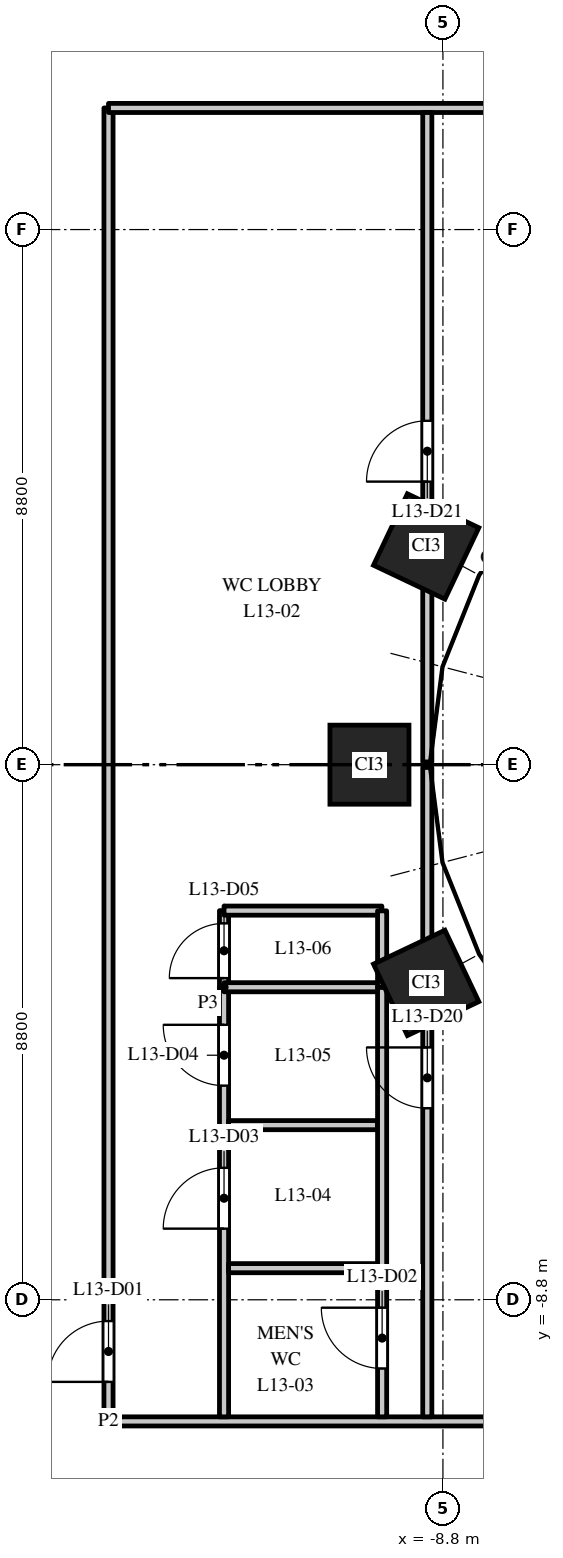
"""IFC4 building model, lengths in metres.
Left out: names, types, materials, properties, quantities, classifications, styles, units other than length and angle.
Written with IfcOpenShell. Run it as: python <this file> out.ifc"""

import sys

from ifc_helpers import new_model, si_unit, direction, frame, frame_2d, origin, origin_2d, place, context, subcontext, project, spatial, rectangle, extrude, element, fill, save


model = new_model("IFC4")
c1 = context("Model", 3, precision=1e-05, world=origin(), true_north=direction((0.0, 1.0)))
c2 = subcontext(c1, "Body", "Model", "MODEL_VIEW")
j1 = project(units=[si_unit("LENGTHUNIT", "METRE"), si_unit("PLANEANGLEUNIT", "RADIAN")], contexts=[c1])
p1 = place(None, origin())
s1 = spatial("IfcSite", under=j1, at=p1, CompositionType="ELEMENT")
p2 = place(p1, origin())
s2 = spatial("IfcBuilding", under=s1, at=p2, CompositionType="ELEMENT")
p3 = place(p2, frame((0.0, 0.0, 62.5)))
s3 = spatial("IfcBuildingStorey", under=s2, at=p3, CompositionType="ELEMENT", Elevation=62.5)
for number, where, z_axis, x_axis in (
    (1, (-9.076, 3.588, 0.0), (0.0, 0.0, 1.0), (-0.429, -0.903, 0.0)),
    (2, (-10.008, 0.0, 0.0), (0.0, 0.0, 1.0), (0.0, -1.0, 0.0)),
    (3, (-9.076, -3.588, 0.0), (0.0, 0.0, 1.0), (0.429, -0.903, 0.0)),
):
    element("IfcColumn", number, at=place(p3, frame(where, z_axis=z_axis, x_axis=x_axis)), inside=s3, PredefinedType="COLUMN", context=c2, shape_type="SweptSolid", body=[
        extrude(rectangle(XDim=1.3, YDim=1.3, at=origin_2d()), origin(), (0.0, 0.0, 1.0), 4.0),
    ])
p4 = place(p3, frame((-14.3, -10.8, 0.0), z_axis=(0.0, 0.0, 1.0), x_axis=(0.0, 1.0, 0.0)))
e4 = element("IfcWall", 4, at=p4, inside=s3, PredefinedType="PARTITIONING", context=c2, shape_type="SweptSolid", body=[
    extrude(rectangle(XDim=21.6, YDim=0.15, at=frame_2d((10.8, 0.0))), origin(), (0.0, 0.0, 1.0), 2.75),
])
p5 = place(p4, frame((0.65, 0.0, 0.0)))
e5 = element("IfcOpeningElement", 5, at=p5, cuts=e4, PredefinedType="OPENING", context=c2, shape_type="SweptSolid", body=[
    extrude(rectangle(XDim=1.0, YDim=2.1, at=frame_2d((0.5, 1.05))), frame((0.0, 0.085, 0.0), z_axis=(0.0, -1.0, 0.0), x_axis=(1.0, 0.0, 0.0)), (0.0, 0.0, 1.0), 0.17),
])
p6 = place(p3, frame((-14.3, -10.8, 0.0), z_axis=(0.0, 0.0, 1.0), x_axis=(1.0, 0.0, 0.0)))
e6 = element("IfcWall", 6, at=p6, inside=s3, PredefinedType="PARTITIONING", context=c2, shape_type="SweptSolid", body=[
    extrude(rectangle(XDim=28.6, YDim=0.15, at=frame_2d((14.3, 0.0))), origin(), (0.0, 0.0, 1.0), 2.85),
])
p7 = place(p6, frame((10.627, 0.0, 0.0)))
e7 = element("IfcOpeningElement", 7, at=p7, cuts=e6, PredefinedType="OPENING", context=c2, shape_type="SweptSolid", body=[
    extrude(rectangle(XDim=1.0, YDim=2.1, at=frame_2d((0.5, 1.05))), frame((0.0, 0.085, 0.0), z_axis=(0.0, -1.0, 0.0), x_axis=(1.0, 0.0, 0.0)), (0.0, 0.0, 1.0), 0.17),
])
p8 = place(p6, frame((15.393, 0.0, 0.0)))
e8 = element("IfcOpeningElement", 8, at=p8, cuts=e6, PredefinedType="OPENING", context=c2, shape_type="SweptSolid", body=[
    extrude(rectangle(XDim=1.0, YDim=2.1, at=frame_2d((0.5, 1.05))), frame((0.0, 0.085, 0.0), z_axis=(0.0, -1.0, 0.0), x_axis=(1.0, 0.0, 0.0)), (0.0, 0.0, 1.0), 0.17),
])
p9 = place(p3, frame((-14.3, 10.8, 0.0), z_axis=(0.0, 0.0, 1.0), x_axis=(1.0, 0.0, 0.0)))
e9 = element("IfcWall", 9, at=p9, inside=s3, PredefinedType="PARTITIONING", context=c2, shape_type="SweptSolid", body=[
    extrude(rectangle(XDim=28.6, YDim=0.15, at=frame_2d((14.3, 0.0))), origin(), (0.0, 0.0, 1.0), 2.85),
])
p10 = place(p9, frame((10.66, 0.0, 0.0)))
e10 = element("IfcOpeningElement", 10, at=p10, cuts=e9, PredefinedType="OPENING", context=c2, shape_type="SweptSolid", body=[
    extrude(rectangle(XDim=1.0, YDim=2.1, at=frame_2d((0.5, 1.05))), frame((0.0, 0.085, 0.0), z_axis=(0.0, -1.0, 0.0), x_axis=(1.0, 0.0, 0.0)), (0.0, 0.0, 1.0), 0.17),
])
p11 = place(p9, frame((15.427, 0.0, 0.0)))
e11 = element("IfcOpeningElement", 11, at=p11, cuts=e9, PredefinedType="OPENING", context=c2, shape_type="SweptSolid", body=[
    extrude(rectangle(XDim=1.0, YDim=2.1, at=frame_2d((0.5, 1.05))), frame((0.0, 0.085, 0.0), z_axis=(0.0, -1.0, 0.0), x_axis=(1.0, 0.0, 0.0)), (0.0, 0.0, 1.0), 0.17),
])
p12 = place(p9, frame((22.693, 0.0, 0.0)))
e12 = element("IfcOpeningElement", 12, at=p12, cuts=e9, PredefinedType="OPENING", context=c2, shape_type="SweptSolid", body=[
    extrude(rectangle(XDim=1.0, YDim=2.1, at=frame_2d((0.5, 1.05))), frame((0.0, 0.085, 0.0), z_axis=(0.0, -1.0, 0.0), x_axis=(1.0, 0.0, 0.0)), (0.0, 0.0, 1.0), 0.17),
])
p13 = place(p3, frame((-12.4, -10.725, 0.0), z_axis=(0.0, 0.0, 1.0), x_axis=(0.0, 1.0, 0.0)))
e13 = element("IfcWall", 13, at=p13, inside=s3, PredefinedType="PARTITIONING", context=c2, shape_type="SweptSolid", body=[
    extrude(rectangle(XDim=7.065, YDim=0.15, at=frame_2d((3.533, 0.0))), origin(), (0.0, 0.0, 1.0), 2.75),
])
p14 = place(p13, frame((3.095, 0.0, 0.0)))
e14 = element("IfcOpeningElement", 14, at=p14, cuts=e13, PredefinedType="OPENING", context=c2, shape_type="SweptSolid", body=[
    extrude(rectangle(XDim=1.0, YDim=2.1, at=frame_2d((0.5, 1.05))), frame((0.0, 0.085, 0.0), z_axis=(0.0, -1.0, 0.0), x_axis=(1.0, 0.0, 0.0)), (0.0, 0.0, 1.0), 0.17),
])
p15 = place(p13, frame((5.447, 0.0, 0.0)))
e15 = element("IfcOpeningElement", 15, at=p15, cuts=e13, PredefinedType="OPENING", context=c2, shape_type="SweptSolid", body=[
    extrude(rectangle(XDim=1.0, YDim=2.1, at=frame_2d((0.5, 1.05))), frame((0.0, 0.085, 0.0), z_axis=(0.0, -1.0, 0.0), x_axis=(1.0, 0.0, 0.0)), (0.0, 0.0, 1.0), 0.17),
])
p16 = place(p3, frame((-12.325, -8.28, 0.0), z_axis=(0.0, 0.0, 1.0), x_axis=(1.0, 0.0, 0.0)))
e16 = element("IfcWall", 16, at=p16, inside=s3, PredefinedType="PARTITIONING", context=c2, shape_type="SweptSolid", body=[
    extrude(rectangle(XDim=2.45, YDim=0.15, at=frame_2d((1.225, 0.0))), origin(), (0.0, 0.0, 1.0), 2.75),
])
p17 = place(p3, frame((-12.325, -5.928, 0.0), z_axis=(0.0, 0.0, 1.0), x_axis=(1.0, 0.0, 0.0)))
e17 = element("IfcWall", 17, at=p17, inside=s3, PredefinedType="PARTITIONING", context=c2, shape_type="SweptSolid", body=[
    extrude(rectangle(XDim=2.45, YDim=0.15, at=frame_2d((1.225, 0.0))), origin(), (0.0, 0.0, 1.0), 3.7),
])
p18 = place(p3, frame((-12.4, -3.66, 0.0), z_axis=(0.0, 0.0, 1.0), x_axis=(0.0, 1.0, 0.0)))
e18 = element("IfcWall", 18, at=p18, inside=s3, PredefinedType="PARTITIONING", context=c2, shape_type="SweptSolid", body=[
    extrude(rectangle(XDim=1.26, YDim=0.15, at=frame_2d((0.63, 0.0))), origin(), (0.0, 0.0, 1.0), 3.7),
])
p19 = place(p18, frame((0.15, 0.0, 0.0)))
e19 = element("IfcOpeningElement", 19, at=p19, cuts=e18, PredefinedType="OPENING", context=c2, shape_type="SweptSolid", body=[
    extrude(rectangle(XDim=0.9, YDim=2.1, at=frame_2d((0.45, 1.05))), frame((0.0, 0.085, 0.0), z_axis=(0.0, -1.0, 0.0), x_axis=(1.0, 0.0, 0.0)), (0.0, 0.0, 1.0), 0.17),
])
p20 = place(p3, frame((-12.4, -3.66, 0.0), z_axis=(0.0, 0.0, 1.0), x_axis=(1.0, 0.0, 0.0)))
e20 = element("IfcWall", 20, at=p20, inside=s3, PredefinedType="PARTITIONING", context=c2, shape_type="SweptSolid", body=[
    extrude(rectangle(XDim=2.6, YDim=0.15, at=frame_2d((1.3, 0.0))), origin(), (0.0, 0.0, 1.0), 3.7),
])
p21 = place(p3, frame((-12.4, -2.4, 0.0), z_axis=(0.0, 0.0, 1.0), x_axis=(1.0, 0.0, 0.0)))
e21 = element("IfcWall", 21, at=p21, inside=s3, PredefinedType="PARTITIONING", context=c2, shape_type="SweptSolid", body=[
    extrude(rectangle(XDim=2.596, YDim=0.15, at=frame_2d((1.298, 0.0))), origin(), (0.0, 0.0, 1.0), 3.7),
])
p22 = place(p3, frame((-9.8, -10.725, 0.0), z_axis=(0.0, 0.0, 1.0), x_axis=(0.0, 1.0, 0.0)))
e22 = element("IfcWall", 22, at=p22, inside=s3, PredefinedType="PARTITIONING", context=c2, shape_type="SweptSolid", body=[
    extrude(rectangle(XDim=7.065, YDim=0.15, at=frame_2d((3.533, 0.0))), origin(), (0.0, 0.0, 1.0), 2.75),
])
p23 = place(p22, frame((0.795, 0.0, 0.0)))
e23 = element("IfcOpeningElement", 23, at=p23, cuts=e22, PredefinedType="OPENING", context=c2, shape_type="SweptSolid", body=[
    extrude(rectangle(XDim=1.0, YDim=2.1, at=frame_2d((0.5, 1.05))), frame((0.0, 0.085, 0.0), z_axis=(0.0, -1.0, 0.0), x_axis=(1.0, 0.0, 0.0)), (0.0, 0.0, 1.0), 0.17),
])
p24 = place(p3, frame((-9.8, -3.66, 0.0), z_axis=(0.0, 0.0, 1.0), x_axis=(0.0, 1.0, 0.0)))
e24 = element("IfcWall", 24, at=p24, inside=s3, PredefinedType="PARTITIONING", context=c2, shape_type="SweptSolid", body=[
    extrude(rectangle(XDim=1.256, YDim=0.15, at=frame_2d((0.628, 0.0))), origin(), (0.0, 0.0, 1.0), 3.7),
])
p25 = place(p3, frame((-9.057, -10.725, 0.0), z_axis=(0.0, 0.0, 1.0), x_axis=(0.0, 1.0, 0.0)))
e25 = element("IfcWall", 25, at=p25, inside=s3, PredefinedType="PARTITIONING", context=c2, shape_type="SweptSolid", body=[
    extrude(rectangle(XDim=10.68, YDim=0.15, at=frame_2d((5.34, 0.0))), origin(), (0.0, 0.0, 1.0), 2.75),
])
p26 = place(p25, frame((5.075, 0.0, 0.0)))
e26 = element("IfcOpeningElement", 26, at=p26, cuts=e25, PredefinedType="OPENING", context=c2, shape_type="SweptSolid", body=[
    extrude(rectangle(XDim=1.0, YDim=2.1, at=frame_2d((0.5, 1.05))), frame((0.0, 0.085, 0.0), z_axis=(0.0, -1.0, 0.0), x_axis=(1.0, 0.0, 0.0)), (0.0, 0.0, 1.0), 0.17),
])
p27 = place(p3, frame((-9.057, 0.045, 0.0), z_axis=(0.0, 0.0, 1.0), x_axis=(0.0, 1.0, 0.0)))
e27 = element("IfcWall", 27, at=p27, inside=s3, PredefinedType="PARTITIONING", context=c2, shape_type="SweptSolid", body=[
    extrude(rectangle(XDim=10.68, YDim=0.15, at=frame_2d((5.34, 0.0))), origin(), (0.0, 0.0, 1.0), 2.75),
])
p28 = place(p27, frame((4.61, 0.0, 0.0)))
e28 = element("IfcOpeningElement", 28, at=p28, cuts=e27, PredefinedType="OPENING", context=c2, shape_type="SweptSolid", body=[
    extrude(rectangle(XDim=1.0, YDim=2.1, at=frame_2d((0.5, 1.05))), frame((0.0, 0.085, 0.0), z_axis=(0.0, -1.0, 0.0), x_axis=(1.0, 0.0, 0.0)), (0.0, 0.0, 1.0), 0.17),
])
p29 = place(p5, origin())
e29 = element("IfcDoor", 29, at=p29, inside=s3, OperationType="SINGLE_SWING_LEFT", PredefinedType="DOOR", context=c2, shape_type="SweptSolid", body=[
    extrude(rectangle(XDim=1.0, YDim=2.1, at=frame_2d((0.5, 1.05))), frame((0.0, 0.025, 0.0), z_axis=(0.0, -1.0, 0.0), x_axis=(1.0, 0.0, 0.0)), (0.0, 0.0, 1.0), 0.05),
])
fill(e5, e29)
p30 = place(p23, origin())
e30 = element("IfcDoor", 30, at=p30, inside=s3, OperationType="SINGLE_SWING_RIGHT", PredefinedType="DOOR", context=c2, shape_type="SweptSolid", body=[
    extrude(rectangle(XDim=1.0, YDim=2.1, at=frame_2d((0.5, 1.05))), frame((0.0, 0.025, 0.0), z_axis=(0.0, -1.0, 0.0), x_axis=(1.0, 0.0, 0.0)), (0.0, 0.0, 1.0), 0.05),
])
fill(e23, e30)
p31 = place(p14, origin())
e31 = element("IfcDoor", 31, at=p31, inside=s3, OperationType="SINGLE_SWING_LEFT", PredefinedType="DOOR", context=c2, shape_type="SweptSolid", body=[
    extrude(rectangle(XDim=1.0, YDim=2.1, at=frame_2d((0.5, 1.05))), frame((0.0, 0.025, 0.0), z_axis=(0.0, -1.0, 0.0), x_axis=(1.0, 0.0, 0.0)), (0.0, 0.0, 1.0), 0.05),
])
fill(e14, e31)
p32 = place(p15, origin())
e32 = element("IfcDoor", 32, at=p32, inside=s3, OperationType="SINGLE_SWING_RIGHT", PredefinedType="DOOR", context=c2, shape_type="SweptSolid", body=[
    extrude(rectangle(XDim=1.0, YDim=2.1, at=frame_2d((0.5, 1.05))), frame((0.0, 0.025, 0.0), z_axis=(0.0, -1.0, 0.0), x_axis=(1.0, 0.0, 0.0)), (0.0, 0.0, 1.0), 0.05),
])
fill(e15, e32)
p33 = place(p19, origin())
e33 = element("IfcDoor", 33, at=p33, inside=s3, OperationType="SINGLE_SWING_LEFT", PredefinedType="DOOR", context=c2, shape_type="SweptSolid", body=[
    extrude(rectangle(XDim=0.9, YDim=2.1, at=frame_2d((0.45, 1.05))), frame((0.0, 0.025, 0.0), z_axis=(0.0, -1.0, 0.0), x_axis=(1.0, 0.0, 0.0)), (0.0, 0.0, 1.0), 0.05),
])
fill(e19, e33)
p34 = place(p26, origin())
e34 = element("IfcDoor", 34, at=p34, inside=s3, OperationType="SINGLE_SWING_RIGHT", PredefinedType="DOOR", context=c2, shape_type="SweptSolid", body=[
    extrude(rectangle(XDim=1.0, YDim=2.1, at=frame_2d((0.5, 1.05))), frame((0.0, 0.025, 0.0), z_axis=(0.0, -1.0, 0.0), x_axis=(1.0, 0.0, 0.0)), (0.0, 0.0, 1.0), 0.05),
])
fill(e26, e34)
p35 = place(p28, origin())
e35 = element("IfcDoor", 35, at=p35, inside=s3, OperationType="SINGLE_SWING_LEFT", PredefinedType="DOOR", context=c2, shape_type="SweptSolid", body=[
    extrude(rectangle(XDim=1.0, YDim=2.1, at=frame_2d((0.5, 1.05))), frame((0.0, 0.025, 0.0), z_axis=(0.0, -1.0, 0.0), x_axis=(1.0, 0.0, 0.0)), (0.0, 0.0, 1.0), 0.05),
])
fill(e28, e35)
save(model, sys.argv[1])
